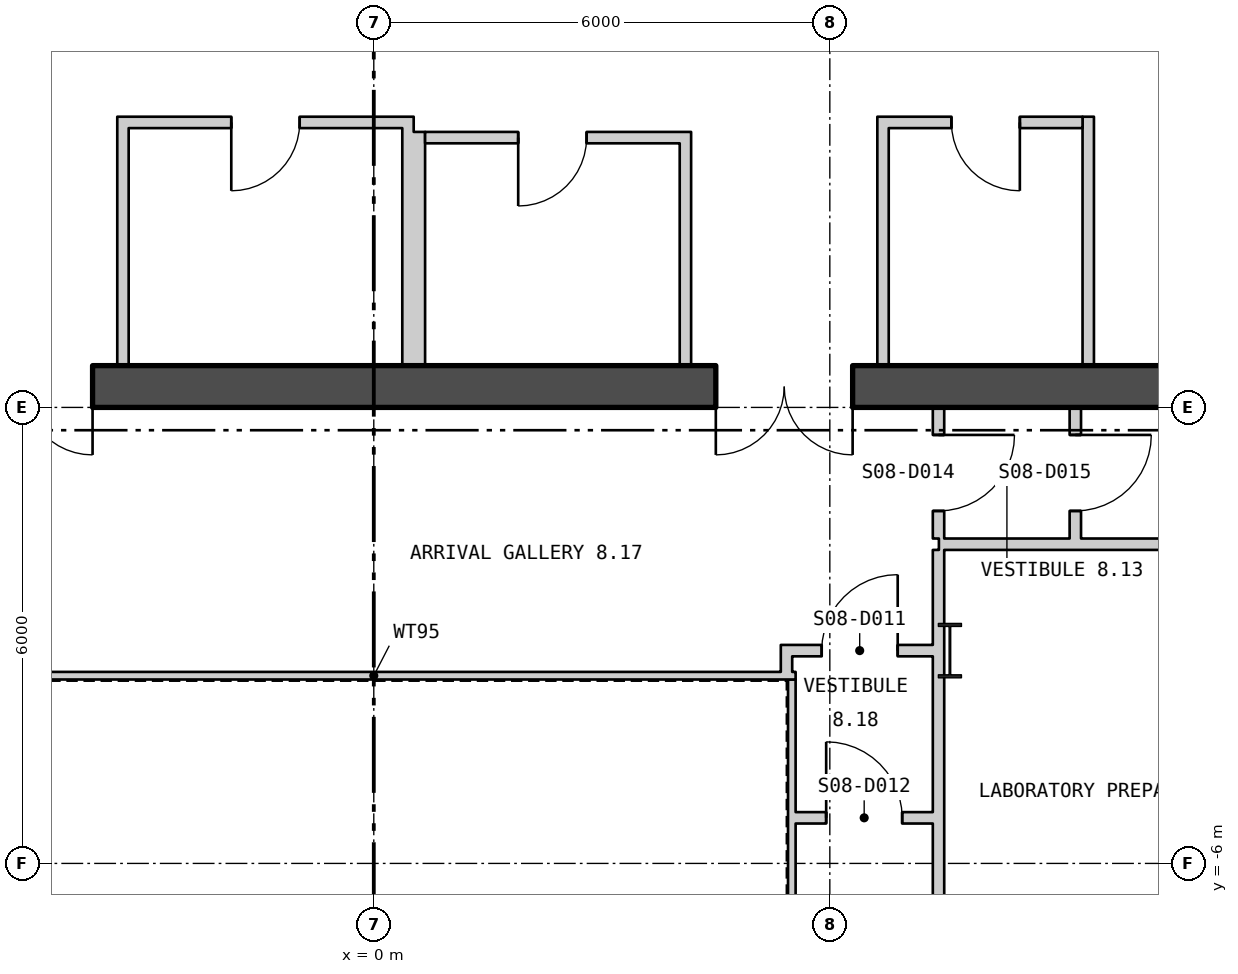
"""IFC4 building model, lengths in metres.
Left out: names, types, materials, properties, quantities, classifications, styles, units other than length and angle.
Written with IfcOpenShell. Run it as: python <this file> out.ifc"""

import sys

from ifc_helpers import new_model, si_unit, direction, frame, frame_2d, origin, origin_2d, place, context, subcontext, project, spatial, polyline, rectangle, i_section, outline, extrude, element, fill, save


model = new_model("IFC4")
c1 = context("Model", 3, precision=1e-05, world=origin(), true_north=direction((0.0, 1.0)))
c2 = subcontext(c1, "Body", "Model", "MODEL_VIEW")
j1 = project(units=[si_unit("LENGTHUNIT", "METRE"), si_unit("PLANEANGLEUNIT", "RADIAN")], contexts=[c1])
p1 = place(None, origin())
s1 = spatial("IfcSite", under=j1, at=p1, CompositionType="ELEMENT")
p2 = place(p1, origin())
s2 = spatial("IfcBuilding", under=s1, at=p2, CompositionType="ELEMENT")
p3 = place(p2, frame((0.0, 0.0, 111.3)))
s3 = spatial("IfcBuildingStorey", under=s2, at=p3, CompositionType="ELEMENT", Elevation=111.3)
p4 = place(p3, frame((7.58, -3.2, 0.0), z_axis=(0.0, 0.0, 1.0), x_axis=(1.0, 0.0, 0.0)))
e1 = element("IfcColumn", 1, at=p4, inside=s3, PredefinedType="COLUMN", context=c2, shape_type="SweptSolid", body=[
    extrude(i_section(OverallWidth=0.304, OverallDepth=0.716, WebThickness=0.021, FlangeThickness=0.04, at=origin_2d()), origin(), (0.0, 0.0, 1.0), 4.5),
])
p5 = place(p3, frame((4.73, -27.821, -0.18), z_axis=(0.0, 0.0, 1.0), x_axis=(0.500000141277, 0.866025322218, 0.0)))
e2 = element("IfcWall", 2, at=p5, inside=s3, PredefinedType="SOLIDWALL", context=c2, shape_type="SweptSolid", body=[
    extrude(outline(polyline([(-0.13, -0.225), (45.86, -0.225), (45.6, 0.225), (0.13, 0.225), (-0.13, -0.225)])), origin(), (0.0, 0.0, 1.0), 4.28),
])
p6 = place(p5, frame((1.424, 0.0, 1.08)))
e3 = element("IfcOpeningElement", 3, at=p6, cuts=e2, PredefinedType="OPENING", context=c2, shape_type="SweptSolid", body=[
    extrude(rectangle(XDim=2.4, YDim=2.6, at=frame_2d((1.2, 1.3))), frame((0.0, 0.235, 0.0), z_axis=(0.0, -1.0, 0.0), x_axis=(1.0, 0.0, 0.0)), (0.0, 0.0, 1.0), 0.47),
])
p7 = place(p5, frame((5.892, 0.0, 1.08)))
e4 = element("IfcOpeningElement", 4, at=p7, cuts=e2, PredefinedType="OPENING", context=c2, shape_type="SweptSolid", body=[
    extrude(rectangle(XDim=2.4, YDim=2.6, at=frame_2d((1.2, 1.3))), frame((0.0, 0.235, 0.0), z_axis=(0.0, -1.0, 0.0), x_axis=(1.0, 0.0, 0.0)), (0.0, 0.0, 1.0), 0.47),
])
p8 = place(p5, frame((10.399, 0.0, 1.08)))
e5 = element("IfcOpeningElement", 5, at=p8, cuts=e2, PredefinedType="OPENING", context=c2, shape_type="SweptSolid", body=[
    extrude(rectangle(XDim=2.4, YDim=2.6, at=frame_2d((1.2, 1.3))), frame((0.0, 0.235, 0.0), z_axis=(0.0, -1.0, 0.0), x_axis=(1.0, 0.0, 0.0)), (0.0, 0.0, 1.0), 0.47),
])
p9 = place(p5, frame((14.905, 0.0, 1.08)))
e6 = element("IfcOpeningElement", 6, at=p9, cuts=e2, PredefinedType="OPENING", context=c2, shape_type="SweptSolid", body=[
    extrude(rectangle(XDim=2.4, YDim=2.6, at=frame_2d((1.2, 1.3))), frame((0.0, 0.235, 0.0), z_axis=(0.0, -1.0, 0.0), x_axis=(1.0, 0.0, 0.0)), (0.0, 0.0, 1.0), 0.47),
])
p10 = place(p5, frame((19.412, 0.0, 1.08)))
e7 = element("IfcOpeningElement", 7, at=p10, cuts=e2, PredefinedType="OPENING", context=c2, shape_type="SweptSolid", body=[
    extrude(rectangle(XDim=2.4, YDim=2.6, at=frame_2d((1.2, 1.3))), frame((0.0, 0.235, 0.0), z_axis=(0.0, -1.0, 0.0), x_axis=(1.0, 0.0, 0.0)), (0.0, 0.0, 1.0), 0.47),
])
p11 = place(p5, frame((23.918, 0.0, 1.08)))
e8 = element("IfcOpeningElement", 8, at=p11, cuts=e2, PredefinedType="OPENING", context=c2, shape_type="SweptSolid", body=[
    extrude(rectangle(XDim=2.4, YDim=2.6, at=frame_2d((1.2, 1.3))), frame((0.0, 0.235, 0.0), z_axis=(0.0, -1.0, 0.0), x_axis=(1.0, 0.0, 0.0)), (0.0, 0.0, 1.0), 0.47),
])
p12 = place(p5, frame((28.425, 0.0, 1.08)))
e9 = element("IfcOpeningElement", 9, at=p12, cuts=e2, PredefinedType="OPENING", context=c2, shape_type="SweptSolid", body=[
    extrude(rectangle(XDim=2.4, YDim=2.6, at=frame_2d((1.2, 1.3))), frame((0.0, 0.235, 0.0), z_axis=(0.0, -1.0, 0.0), x_axis=(1.0, 0.0, 0.0)), (0.0, 0.0, 1.0), 0.47),
])
p13 = place(p5, frame((32.932, 0.0, 1.08)))
e10 = element("IfcOpeningElement", 10, at=p13, cuts=e2, PredefinedType="OPENING", context=c2, shape_type="SweptSolid", body=[
    extrude(rectangle(XDim=2.4, YDim=2.6, at=frame_2d((1.2, 1.3))), frame((0.0, 0.235, 0.0), z_axis=(0.0, -1.0, 0.0), x_axis=(1.0, 0.0, 0.0)), (0.0, 0.0, 1.0), 0.47),
])
p14 = place(p5, frame((37.438, 0.0, 1.08)))
e11 = element("IfcOpeningElement", 11, at=p14, cuts=e2, PredefinedType="OPENING", context=c2, shape_type="SweptSolid", body=[
    extrude(rectangle(XDim=2.4, YDim=2.6, at=frame_2d((1.2, 1.3))), frame((0.0, 0.235, 0.0), z_axis=(0.0, -1.0, 0.0), x_axis=(1.0, 0.0, 0.0)), (0.0, 0.0, 1.0), 0.47),
])
p15 = place(p5, frame((41.907, 0.0, 1.08)))
e12 = element("IfcOpeningElement", 12, at=p15, cuts=e2, PredefinedType="OPENING", context=c2, shape_type="SweptSolid", body=[
    extrude(rectangle(XDim=2.4, YDim=2.6, at=frame_2d((1.2, 1.3))), frame((0.0, 0.235, 0.0), z_axis=(0.0, -1.0, 0.0), x_axis=(1.0, 0.0, 0.0)), (0.0, 0.0, 1.0), 0.47),
])
p16 = place(p3, frame((5.5, -11.62, 0.0), z_axis=(0.0, 0.0, 1.0), x_axis=(0.0, 1.0, 0.0)))
e13 = element("IfcWall", 13, at=p16, inside=s3, PredefinedType="PARTITIONING", context=c2, shape_type="SweptSolid", body=[
    extrude(rectangle(XDim=8.04, YDim=0.1, at=frame_2d((4.02, 0.0))), origin(), (0.0, 0.0, 1.0), 4.3),
])
p17 = place(p3, frame((5.55, -3.53, 0.0), z_axis=(0.0, 0.0, 1.0), x_axis=(-1.0, 0.0, 0.0)))
e14 = element("IfcWall", 14, at=p17, inside=s3, PredefinedType="PARTITIONING", context=c2, shape_type="SweptSolid", body=[
    extrude(rectangle(XDim=11.1, YDim=0.1, at=frame_2d((5.55, 0.0))), origin(), (0.0, 0.0, 1.0), 4.3),
])
p18 = place(p3, frame((-17.5, 0.275, 0.0), z_axis=(0.0, 0.0, 1.0), x_axis=(1.0, 0.0, 0.0)))
e15 = element("IfcWall", 15, at=p18, inside=s3, PredefinedType="SHEAR", context=c2, shape_type="SweptSolid", body=[
    extrude(rectangle(XDim=35.0, YDim=0.55, at=frame_2d((17.5, 0.0))), origin(), (0.0, 0.0, 1.0), 4.3),
])
p19 = place(p18, frame((12.0, 0.0, 0.0)))
e16 = element("IfcOpeningElement", 16, at=p19, cuts=e15, PredefinedType="OPENING", context=c2, shape_type="SweptSolid", body=[
    extrude(rectangle(XDim=1.8, YDim=2.4, at=frame_2d((0.9, 1.2))), frame((0.0, 0.285, 0.0), z_axis=(0.0, -1.0, 0.0), x_axis=(1.0, 0.0, 0.0)), (0.0, 0.0, 1.0), 0.57),
])
p20 = place(p18, frame((22.0, 0.0, 0.0)))
e17 = element("IfcOpeningElement", 17, at=p20, cuts=e15, PredefinedType="OPENING", context=c2, shape_type="SweptSolid", body=[
    extrude(rectangle(XDim=1.8, YDim=2.4, at=frame_2d((0.9, 1.2))), frame((0.0, 0.285, 0.0), z_axis=(0.0, -1.0, 0.0), x_axis=(1.0, 0.0, 0.0)), (0.0, 0.0, 1.0), 0.57),
])
for number, where, z_axis, x_axis in (
    (18, (-3.3, 0.55, 0.0), (0.0, 0.0, 1.0), (0.0, 1.0, 0.0)),
    (19, (0.45, 0.55, 0.0), (0.0, 0.0, 1.0), (0.0, 1.0, 0.0)),
):
    element("IfcWall", number, at=place(p3, frame(where, z_axis=z_axis, x_axis=x_axis)), inside=s3, PredefinedType="PARTITIONING", context=c2, shape_type="SweptSolid", body=[
        extrude(rectangle(XDim=3.275, YDim=0.15, at=frame_2d((1.637, 0.0))), origin(), (0.0, 0.0, 1.0), 4.3),
    ])
p21 = place(p3, frame((-3.225, 3.75, 0.0), z_axis=(0.0, 0.0, 1.0), x_axis=(1.0, 0.0, 0.0)))
e20 = element("IfcWall", 20, at=p21, inside=s3, PredefinedType="PARTITIONING", context=c2, shape_type="SweptSolid", body=[
    extrude(rectangle(XDim=3.6, YDim=0.15, at=frame_2d((1.8, 0.0))), origin(), (0.0, 0.0, 1.0), 4.3),
])
p22 = place(p21, frame((1.35, 0.0, 0.0)))
e21 = element("IfcOpeningElement", 21, at=p22, cuts=e20, PredefinedType="OPENING", context=c2, shape_type="SweptSolid", body=[
    extrude(rectangle(XDim=0.9, YDim=2.1, at=frame_2d((0.45, 1.05))), frame((0.0, 0.085, 0.0), z_axis=(0.0, -1.0, 0.0), x_axis=(1.0, 0.0, 0.0)), (0.0, 0.0, 1.0), 0.17),
])
for number, where, z_axis, x_axis in (
    (22, (0.6, 0.55, 0.0), (0.0, 0.0, 1.0), (0.0, 1.0, 0.0)),
    (23, (4.1, 0.55, 0.0), (0.0, 0.0, 1.0), (0.0, 1.0, 0.0)),
):
    element("IfcWall", number, at=place(p3, frame(where, z_axis=z_axis, x_axis=x_axis)), inside=s3, PredefinedType="PARTITIONING", context=c2, shape_type="SweptSolid", body=[
        extrude(rectangle(XDim=3.075, YDim=0.15, at=frame_2d((1.538, 0.0))), origin(), (0.0, 0.0, 1.0), 4.3),
    ])
p23 = place(p3, frame((0.675, 3.55, 0.0), z_axis=(0.0, 0.0, 1.0), x_axis=(1.0, 0.0, 0.0)))
e24 = element("IfcWall", 24, at=p23, inside=s3, PredefinedType="PARTITIONING", context=c2, shape_type="SweptSolid", body=[
    extrude(rectangle(XDim=3.35, YDim=0.15, at=frame_2d((1.675, 0.0))), origin(), (0.0, 0.0, 1.0), 4.3),
])
p24 = place(p23, frame((1.225, 0.0, 0.0)))
e25 = element("IfcOpeningElement", 25, at=p24, cuts=e24, PredefinedType="OPENING", context=c2, shape_type="SweptSolid", body=[
    extrude(rectangle(XDim=0.9, YDim=2.1, at=frame_2d((0.45, 1.05))), frame((0.0, 0.085, 0.0), z_axis=(0.0, -1.0, 0.0), x_axis=(1.0, 0.0, 0.0)), (0.0, 0.0, 1.0), 0.17),
])
for number, where, z_axis, x_axis in (
    (26, (6.7, 0.55, 0.0), (0.0, 0.0, 1.0), (0.0, 1.0, 0.0)),
    (27, (9.4, 0.55, 0.0), (0.0, 0.0, 1.0), (0.0, 1.0, 0.0)),
):
    element("IfcWall", number, at=place(p3, frame(where, z_axis=z_axis, x_axis=x_axis)), inside=s3, PredefinedType="PARTITIONING", context=c2, shape_type="SweptSolid", body=[
        extrude(rectangle(XDim=3.275, YDim=0.15, at=frame_2d((1.637, 0.0))), origin(), (0.0, 0.0, 1.0), 4.3),
    ])
p25 = place(p3, frame((6.775, 3.75, 0.0), z_axis=(0.0, 0.0, 1.0), x_axis=(1.0, 0.0, 0.0)))
e28 = element("IfcWall", 28, at=p25, inside=s3, PredefinedType="PARTITIONING", context=c2, shape_type="SweptSolid", body=[
    extrude(rectangle(XDim=2.55, YDim=0.15, at=frame_2d((1.275, 0.0))), origin(), (0.0, 0.0, 1.0), 4.3),
])
p26 = place(p25, frame((0.825, 0.0, 0.0)))
e29 = element("IfcOpeningElement", 29, at=p26, cuts=e28, PredefinedType="OPENING", context=c2, shape_type="SweptSolid", body=[
    extrude(rectangle(XDim=0.9, YDim=2.1, at=frame_2d((0.45, 1.05))), frame((0.0, 0.085, 0.0), z_axis=(0.0, -1.0, 0.0), x_axis=(1.0, 0.0, 0.0)), (0.0, 0.0, 1.0), 0.17),
])
p27 = place(p3, frame((5.355, -3.2, 0.0), z_axis=(0.0, 0.0, 1.0), x_axis=(1.0, 0.0, 0.0)))
e30 = element("IfcWall", 30, at=p27, inside=s3, PredefinedType="PARTITIONING", context=c2, shape_type="SweptSolid", body=[
    extrude(rectangle(XDim=2.0, YDim=0.15, at=frame_2d((1.0, 0.0))), origin(), (0.0, 0.0, 1.0), 3.39),
])
p28 = place(p27, frame((0.538, 0.0, 0.0)))
e31 = element("IfcOpeningElement", 31, at=p28, cuts=e30, PredefinedType="OPENING", context=c2, shape_type="SweptSolid", body=[
    extrude(rectangle(XDim=1.0, YDim=2.1, at=frame_2d((0.5, 1.05))), frame((0.0, 0.085, 0.0), z_axis=(0.0, -1.0, 0.0), x_axis=(1.0, 0.0, 0.0)), (0.0, 0.0, 1.0), 0.17),
])
p29 = place(p3, frame((5.43, -3.48, 0.0), z_axis=(0.0, 0.0, 1.0), x_axis=(0.0, 1.0, 0.0)))
e32 = element("IfcWall", 32, at=p29, inside=s3, PredefinedType="PARTITIONING", context=c2, shape_type="SweptSolid", body=[
    extrude(rectangle(XDim=0.205, YDim=0.15, at=frame_2d((0.102, 0.0))), origin(), (0.0, 0.0, 1.0), 4.3),
])
p30 = place(p3, frame((5.55, -5.4, 0.0), z_axis=(0.0, 0.0, 1.0), x_axis=(1.0, 0.0, 0.0)))
e33 = element("IfcWall", 33, at=p30, inside=s3, PredefinedType="PARTITIONING", context=c2, shape_type="SweptSolid", body=[
    extrude(rectangle(XDim=1.805, YDim=0.15, at=frame_2d((0.902, 0.0))), origin(), (0.0, 0.0, 1.0), 4.3),
])
p31 = place(p30, frame((0.402, 0.0, 0.0)))
e34 = element("IfcOpeningElement", 34, at=p31, cuts=e33, PredefinedType="OPENING", context=c2, shape_type="SweptSolid", body=[
    extrude(rectangle(XDim=1.0, YDim=2.1, at=frame_2d((0.5, 1.05))), frame((0.0, 0.085, 0.0), z_axis=(0.0, -1.0, 0.0), x_axis=(1.0, 0.0, 0.0)), (0.0, 0.0, 1.0), 0.17),
])
p32 = place(p3, frame((7.43, -13.675, 0.0), z_axis=(0.0, 0.0, 1.0), x_axis=(0.0, 1.0, 0.0)))
e35 = element("IfcWall", 35, at=p32, inside=s3, PredefinedType="PARTITIONING", context=c2, shape_type="SweptSolid", body=[
    extrude(rectangle(XDim=10.167, YDim=0.15, at=frame_2d((5.083, 0.0))), origin(), (0.0, 0.0, 1.0), 3.7),
])
p33 = place(p32, frame((2.183, 0.0, 0.0)))
e36 = element("IfcOpeningElement", 36, at=p33, cuts=e35, PredefinedType="OPENING", context=c2, shape_type="SweptSolid", body=[
    extrude(rectangle(XDim=1.0, YDim=2.1, at=frame_2d((0.5, 1.05))), frame((0.0, 0.085, 0.0), z_axis=(0.0, -1.0, 0.0), x_axis=(1.0, 0.0, 0.0)), (0.0, 0.0, 1.0), 0.17),
])
p34 = place(p3, frame((7.43, -3.508, 0.0), z_axis=(0.0, 0.0, 1.0), x_axis=(0.0, 1.0, 0.0)))
e37 = element("IfcWall", 37, at=p34, inside=s3, PredefinedType="PARTITIONING", context=c2, shape_type="SweptSolid", body=[
    extrude(rectangle(XDim=1.633, YDim=0.15, at=frame_2d((0.817, 0.0))), origin(), (0.0, 0.0, 1.0), 4.3),
])
p35 = place(p3, frame((7.43, -1.725, 0.0), z_axis=(0.0, 0.0, 1.0), x_axis=(0.0, 1.0, 0.0)))
e38 = element("IfcWall", 38, at=p35, inside=s3, PredefinedType="PARTITIONING", context=c2, shape_type="SweptSolid", body=[
    extrude(rectangle(XDim=1.725, YDim=0.15, at=frame_2d((0.863, 0.0))), origin(), (0.0, 0.0, 1.0), 4.3),
])
p36 = place(p35, frame((0.363, 0.0, 0.0)))
e39 = element("IfcOpeningElement", 39, at=p36, cuts=e38, PredefinedType="OPENING", context=c2, shape_type="SweptSolid", body=[
    extrude(rectangle(XDim=1.0, YDim=2.1, at=frame_2d((0.5, 1.05))), frame((0.0, 0.085, 0.0), z_axis=(0.0, -1.0, 0.0), x_axis=(1.0, 0.0, 0.0)), (0.0, 0.0, 1.0), 0.17),
])
p37 = place(p3, frame((7.435, -1.8, 0.0), z_axis=(0.0, 0.0, 1.0), x_axis=(1.0, 0.0, 0.0)))
e40 = element("IfcWall", 40, at=p37, inside=s3, PredefinedType="PARTITIONING", context=c2, shape_type="SweptSolid", body=[
    extrude(rectangle(XDim=11.79, YDim=0.15, at=frame_2d((5.895, 0.0))), origin(), (0.0, 0.0, 1.0), 4.3),
])
p38 = place(p3, frame((9.23, -1.725, 0.0), z_axis=(0.0, 0.0, 1.0), x_axis=(0.0, 1.0, 0.0)))
e41 = element("IfcWall", 41, at=p38, inside=s3, PredefinedType="PARTITIONING", context=c2, shape_type="SweptSolid", body=[
    extrude(rectangle(XDim=1.725, YDim=0.15, at=frame_2d((0.863, 0.0))), origin(), (0.0, 0.0, 1.0), 4.3),
])
p39 = place(p38, frame((0.363, 0.0, 0.0)))
e42 = element("IfcOpeningElement", 42, at=p39, cuts=e41, PredefinedType="OPENING", context=c2, shape_type="SweptSolid", body=[
    extrude(rectangle(XDim=1.0, YDim=2.1, at=frame_2d((0.5, 1.05))), frame((0.0, 0.085, 0.0), z_axis=(0.0, -1.0, 0.0), x_axis=(1.0, 0.0, 0.0)), (0.0, 0.0, 1.0), 0.17),
])
p40 = place(p22, origin())
e43 = element("IfcDoor", 43, at=p40, inside=s3, OperationType="SINGLE_SWING_LEFT", PredefinedType="DOOR", context=c2, shape_type="SweptSolid", body=[
    extrude(rectangle(XDim=0.9, YDim=2.1, at=frame_2d((0.45, 1.05))), frame((0.0, 0.025, 0.0), z_axis=(0.0, -1.0, 0.0), x_axis=(1.0, 0.0, 0.0)), (0.0, 0.0, 1.0), 0.05),
])
fill(e21, e43)
p41 = place(p24, origin())
e44 = element("IfcDoor", 44, at=p41, inside=s3, OperationType="SINGLE_SWING_LEFT", PredefinedType="DOOR", context=c2, shape_type="SweptSolid", body=[
    extrude(rectangle(XDim=0.9, YDim=2.1, at=frame_2d((0.45, 1.05))), frame((0.0, 0.025, 0.0), z_axis=(0.0, -1.0, 0.0), x_axis=(1.0, 0.0, 0.0)), (0.0, 0.0, 1.0), 0.05),
])
fill(e25, e44)
p42 = place(p26, origin())
e45 = element("IfcDoor", 45, at=p42, inside=s3, OperationType="SINGLE_SWING_RIGHT", PredefinedType="DOOR", context=c2, shape_type="SweptSolid", body=[
    extrude(rectangle(XDim=0.9, YDim=2.1, at=frame_2d((0.45, 1.05))), frame((0.0, 0.025, 0.0), z_axis=(0.0, -1.0, 0.0), x_axis=(1.0, 0.0, 0.0)), (0.0, 0.0, 1.0), 0.05),
])
fill(e29, e45)
p43 = place(p19, origin())
e46 = element("IfcDoor", 46, at=p43, inside=s3, OperationType="DOUBLE_DOOR_SINGLE_SWING", PredefinedType="DOOR", context=c2, shape_type="SweptSolid", body=[
    extrude(rectangle(XDim=1.8, YDim=2.4, at=frame_2d((0.9, 1.2))), frame((0.0, 0.025, 0.0), z_axis=(0.0, -1.0, 0.0), x_axis=(1.0, 0.0, 0.0)), (0.0, 0.0, 1.0), 0.05),
])
fill(e16, e46)
p44 = place(p20, origin())
e47 = element("IfcDoor", 47, at=p44, inside=s3, OperationType="DOUBLE_DOOR_SINGLE_SWING", PredefinedType="DOOR", context=c2, shape_type="SweptSolid", body=[
    extrude(rectangle(XDim=1.8, YDim=2.4, at=frame_2d((0.9, 1.2))), frame((0.0, 0.025, 0.0), z_axis=(0.0, -1.0, 0.0), x_axis=(1.0, 0.0, 0.0)), (0.0, 0.0, 1.0), 0.05),
])
fill(e17, e47)
p45 = place(p28, origin())
e48 = element("IfcDoor", 48, at=p45, inside=s3, OperationType="SINGLE_SWING_LEFT", PredefinedType="DOOR", context=c2, shape_type="SweptSolid", body=[
    extrude(rectangle(XDim=1.0, YDim=2.1, at=frame_2d((0.5, 1.05))), frame((0.0, 0.025, 0.0), z_axis=(0.0, -1.0, 0.0), x_axis=(1.0, 0.0, 0.0)), (0.0, 0.0, 1.0), 0.05),
])
fill(e31, e48)
p46 = place(p31, origin())
e49 = element("IfcDoor", 49, at=p46, inside=s3, OperationType="SINGLE_SWING_RIGHT", PredefinedType="DOOR", context=c2, shape_type="SweptSolid", body=[
    extrude(rectangle(XDim=1.0, YDim=2.1, at=frame_2d((0.5, 1.05))), frame((0.0, 0.025, 0.0), z_axis=(0.0, -1.0, 0.0), x_axis=(1.0, 0.0, 0.0)), (0.0, 0.0, 1.0), 0.05),
])
fill(e34, e49)
p47 = place(p36, origin())
e50 = element("IfcDoor", 50, at=p47, inside=s3, OperationType="SINGLE_SWING_RIGHT", PredefinedType="DOOR", context=c2, shape_type="SweptSolid", body=[
    extrude(rectangle(XDim=1.0, YDim=2.1, at=frame_2d((0.5, 1.05))), frame((0.0, 0.025, 0.0), z_axis=(0.0, -1.0, 0.0), x_axis=(1.0, 0.0, 0.0)), (0.0, 0.0, 1.0), 0.05),
])
fill(e39, e50)
p48 = place(p39, origin())
e51 = element("IfcDoor", 51, at=p48, inside=s3, OperationType="SINGLE_SWING_RIGHT", PredefinedType="DOOR", context=c2, shape_type="SweptSolid", body=[
    extrude(rectangle(XDim=1.0, YDim=2.1, at=frame_2d((0.5, 1.05))), frame((0.0, 0.025, 0.0), z_axis=(0.0, -1.0, 0.0), x_axis=(1.0, 0.0, 0.0)), (0.0, 0.0, 1.0), 0.05),
])
fill(e42, e51)
save(model, sys.argv[1])
